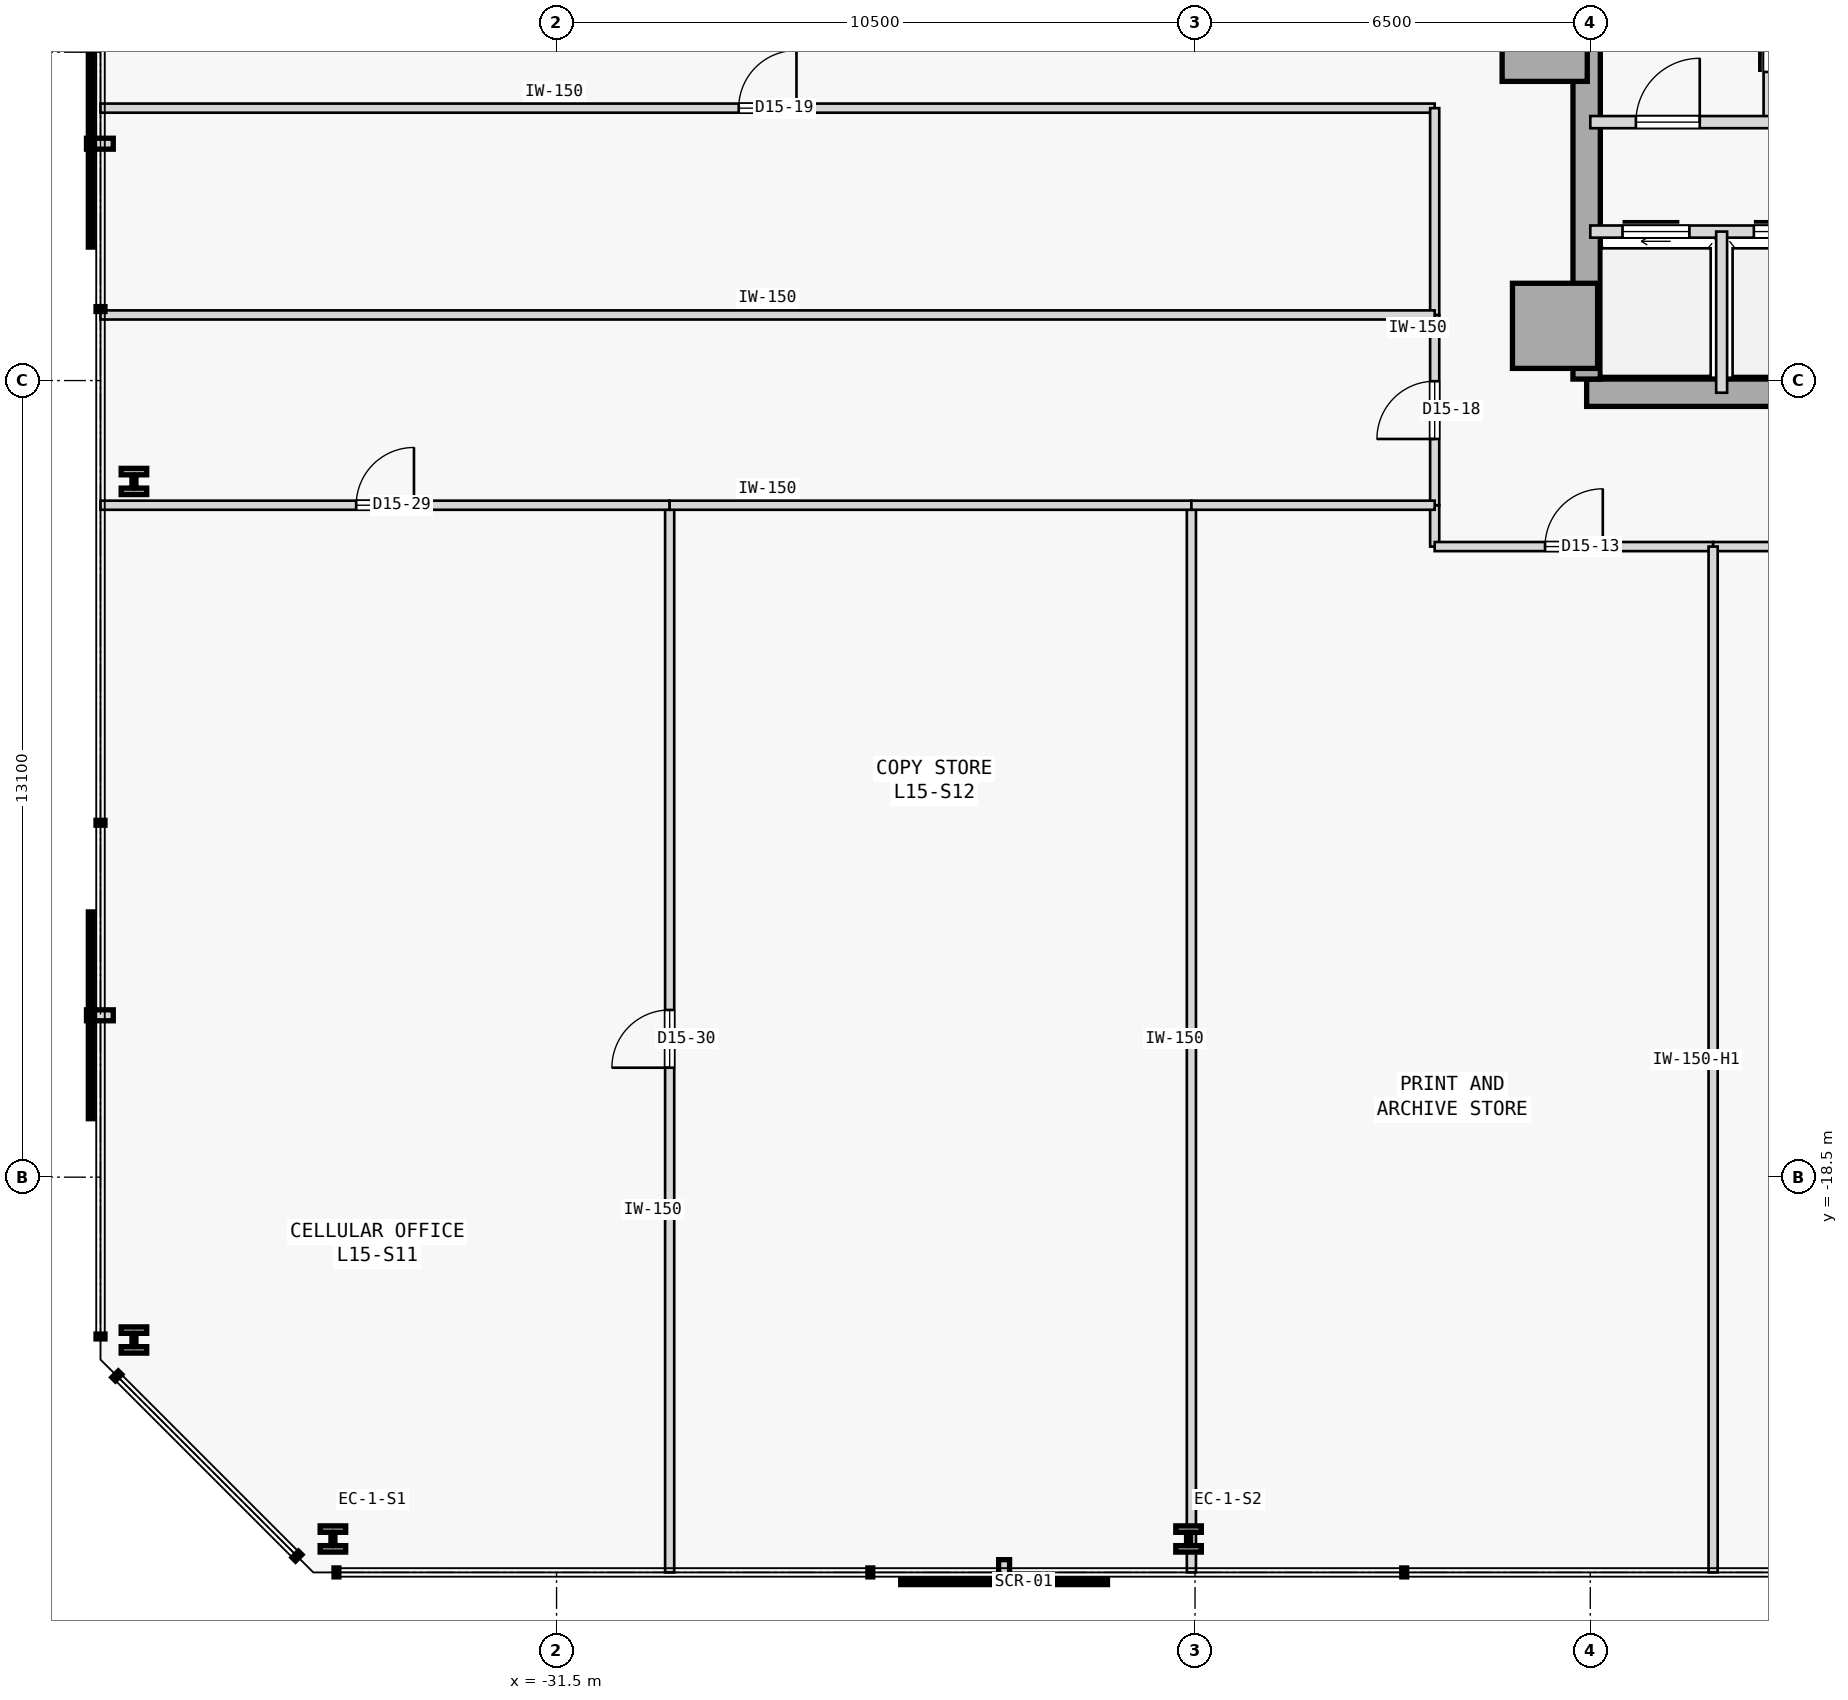
"""IFC4 building model, lengths in metres.
Left out: names, types, materials, properties, quantities, classifications, styles, units other than length and angle.
Written with IfcOpenShell. Run it as: python <this file> out.ifc"""

import sys

from ifc_helpers import new_model, si_unit, direction, frame, frame_2d, origin, origin_2d, place, context, subcontext, project, spatial, rectangle, i_section, extrude, element, fill, save


model = new_model("IFC4")
c1 = context("Model", 3, precision=1e-05, world=origin(), true_north=direction((0.0, 1.0)))
c2 = subcontext(c1, "Body", "Model", "MODEL_VIEW")
j1 = project(units=[si_unit("LENGTHUNIT", "METRE"), si_unit("PLANEANGLEUNIT", "RADIAN")], contexts=[c1])
p1 = place(None, origin())
s1 = spatial("IfcSite", under=j1, at=p1, CompositionType="ELEMENT")
p2 = place(p1, origin())
s2 = spatial("IfcBuilding", under=s1, at=p2, CompositionType="ELEMENT")
p3 = place(p2, frame((0.0, 0.0, 63.6)))
s3 = spatial("IfcBuildingStorey", under=s2, at=p3, CompositionType="ELEMENT", Elevation=63.6)
for number, where, z_axis, x_axis in (
    (1, (-15.25, 0.22, 0.0), (0.0, 0.0, 1.0), (1.0, 0.0, 0.0)),
    (2, (-15.08, -4.5, 0.0), (0.0, 0.0, 1.0), (1.0, 0.0, 0.0)),
):
    element("IfcColumn", number, at=place(p3, frame(where, z_axis=z_axis, x_axis=x_axis)), inside=s3, PredefinedType="COLUMN", context=c2, shape_type="SweptSolid", body=[
        extrude(rectangle(XDim=1.4, YDim=1.4, at=origin_2d()), origin(), (0.0, 0.0, 1.0), 3.8),
    ])
p4 = place(p3, frame((-14.56, -5.6, 0.0), z_axis=(0.0, 0.0, 1.0), x_axis=(1.0, 0.0, 0.0)))
e3 = element("IfcWall", 3, at=p4, inside=s3, PredefinedType="SHEAR", context=c2, shape_type="SweptSolid", body=[
    extrude(rectangle(XDim=10.86, YDim=0.45, at=frame_2d((5.43, 0.0))), origin(), (0.0, 0.0, 1.0), 3.575),
])
p5 = place(p3, frame((-14.56, -5.375, 0.0), z_axis=(0.0, 0.0, 1.0), x_axis=(0.0, 1.0, 0.0)))
e4 = element("IfcWall", 4, at=p5, inside=s3, PredefinedType="SHEAR", context=c2, shape_type="SweptSolid", body=[
    extrude(rectangle(XDim=10.75, YDim=0.45, at=frame_2d((5.375, 0.0))), origin(), (0.0, 0.0, 1.0), 3.575),
])
for number, where, z_axis, x_axis in (
    (5, (-35.178, -24.45, 0.0), (0.0, 0.0, 1.0), (1.0, 0.0, 0.0)),
    (6, (-21.107, -24.45, 0.0), (0.0, 0.0, 1.0), (1.0, 0.0, 0.0)),
    (7, (-38.45, -7.059, 0.0), (0.0, 0.0, 1.0), (1.0, 0.0, 0.0)),
    (8, (-38.45, -21.178, 0.0), (0.0, 0.0, 1.0), (1.0, 0.0, 0.0)),
):
    element("IfcColumn", number, at=place(p3, frame(where, z_axis=z_axis, x_axis=x_axis)), inside=s3, PredefinedType="COLUMN", context=c2, shape_type="SweptSolid", body=[
        extrude(i_section(OverallWidth=0.42, OverallDepth=0.431, WebThickness=0.065, FlangeThickness=0.106, FilletRadius=0.015, at=origin_2d()), origin(), (0.0, 0.0, 1.0), 3.8),
    ])
p6 = place(p3, frame((-11.55, -1.15, 0.0), z_axis=(0.0, 0.0, 1.0), x_axis=(0.0, 1.0, 0.0)))
e9 = element("IfcWall", 9, at=p6, inside=s3, PredefinedType="STANDARD", context=c2, shape_type="SweptSolid", body=[
    extrude(rectangle(XDim=2.75, YDim=0.2, at=frame_2d((1.375, 0.0))), origin(), (0.0, 0.0, 1.0), 3.575),
])
p7 = place(p6, frame((0.825, 0.0, 0.0)))
e10 = element("IfcOpeningElement", 10, at=p7, cuts=e9, PredefinedType="OPENING", context=c2, shape_type="SweptSolid", body=[
    extrude(rectangle(XDim=1.1, YDim=2.15, at=frame_2d((0.55, 1.075))), frame((0.0, 0.11, 0.0), z_axis=(0.0, -1.0, 0.0), x_axis=(1.0, 0.0, 0.0)), (0.0, 0.0, 1.0), 0.22),
])
p8 = place(p3, frame((-14.5, -1.15, 0.0), z_axis=(0.0, 0.0, 1.0), x_axis=(1.0, 0.0, 0.0)))
e11 = element("IfcWall", 11, at=p8, inside=s3, PredefinedType="STANDARD", context=c2, shape_type="SweptSolid", body=[
    extrude(rectangle(XDim=2.95, YDim=0.2, at=frame_2d((1.475, 0.0))), origin(), (0.0, 0.0, 1.0), 3.575),
])
p9 = place(p8, frame((0.75, 0.0, 0.0)))
e12 = element("IfcOpeningElement", 12, at=p9, cuts=e11, PredefinedType="OPENING", context=c2, shape_type="SweptSolid", body=[
    extrude(rectangle(XDim=1.05, YDim=2.18, at=frame_2d((0.525, 1.09))), frame((0.0, 0.11, 0.0), z_axis=(0.0, -1.0, 0.0), x_axis=(1.0, 0.0, 0.0)), (0.0, 0.0, 1.0), 0.22),
])
p10 = place(p3, frame((-14.5, -2.95, 0.0), z_axis=(0.0, 0.0, 1.0), x_axis=(1.0, 0.0, 0.0)))
e13 = element("IfcWall", 13, at=p10, inside=s3, PredefinedType="STANDARD", context=c2, shape_type="SweptSolid", body=[
    extrude(rectangle(XDim=10.8, YDim=0.2, at=frame_2d((5.4, 0.0))), origin(), (0.0, 0.0, 1.0), 3.575),
])
p11 = place(p10, frame((0.53, 0.0, 0.0)))
e14 = element("IfcOpeningElement", 14, at=p11, cuts=e13, PredefinedType="OPENING", context=c2, shape_type="SweptSolid", body=[
    extrude(rectangle(XDim=1.1, YDim=2.15, at=frame_2d((0.55, 1.075))), frame((0.0, 0.11, 0.0), z_axis=(0.0, -1.0, 0.0), x_axis=(1.0, 0.0, 0.0)), (0.0, 0.0, 1.0), 0.22),
])
p12 = place(p10, frame((2.69, 0.0, 0.0)))
e15 = element("IfcOpeningElement", 15, at=p12, cuts=e13, PredefinedType="OPENING", context=c2, shape_type="SweptSolid", body=[
    extrude(rectangle(XDim=1.1, YDim=2.15, at=frame_2d((0.55, 1.075))), frame((0.0, 0.11, 0.0), z_axis=(0.0, -1.0, 0.0), x_axis=(1.0, 0.0, 0.0)), (0.0, 0.0, 1.0), 0.22),
])
p13 = place(p3, frame((-12.34, -5.6, 0.0), z_axis=(0.0, 0.0, 1.0), x_axis=(0.0, 1.0, 0.0)))
e16 = element("IfcWall", 16, at=p13, inside=s3, PredefinedType="STANDARD", context=c2, shape_type="SweptSolid", body=[
    extrude(rectangle(XDim=2.65, YDim=0.18, at=frame_2d((1.325, 0.0))), origin(), (0.0, 0.0, 1.0), 3.575),
])
p14 = place(p3, frame((-17.059, -8.13, 0.0), z_axis=(0.0, 0.0, 1.0), x_axis=(0.0, 1.0, 0.0)))
e17 = element("IfcWall", 17, at=p14, inside=s3, PredefinedType="PARTITIONING", context=c2, shape_type="SweptSolid", body=[
    extrude(rectangle(XDim=0.68, YDim=0.15, at=frame_2d((0.34, 0.0))), origin(), (0.0, 0.0, 1.0), 3.575),
])
p15 = place(p3, frame((-17.059, -8.13, 0.0), z_axis=(0.0, 0.0, 1.0), x_axis=(1.0, 0.0, 0.0)))
e18 = element("IfcWall", 18, at=p15, inside=s3, PredefinedType="PARTITIONING", context=c2, shape_type="SweptSolid", body=[
    extrude(rectangle(XDim=4.579, YDim=0.15, at=frame_2d((2.29, 0.0))), origin(), (0.0, 0.0, 1.0), 3.575),
])
p16 = place(p15, frame((1.814, 0.0, 0.0)))
e19 = element("IfcOpeningElement", 19, at=p16, cuts=e18, PredefinedType="OPENING", context=c2, shape_type="SweptSolid", body=[
    extrude(rectangle(XDim=0.95, YDim=2.15, at=frame_2d((0.475, 1.075))), frame((0.0, 0.085, 0.0), z_axis=(0.0, -1.0, 0.0), x_axis=(1.0, 0.0, 0.0)), (0.0, 0.0, 1.0), 0.17),
])
p17 = place(p3, frame((-12.48, -8.13, 0.0), z_axis=(0.0, 0.0, 1.0), x_axis=(1.0, 0.0, 0.0)))
e20 = element("IfcWall", 20, at=p17, inside=s3, PredefinedType="PARTITIONING", context=c2, shape_type="SweptSolid", body=[
    extrude(rectangle(XDim=11.56, YDim=0.15, at=frame_2d((5.78, 0.0))), origin(), (0.0, 0.0, 1.0), 3.575),
])
p18 = place(p3, frame((-17.059, -7.45, 0.0), z_axis=(0.0, 0.0, 1.0), x_axis=(0.0, 1.0, 0.0)))
e21 = element("IfcWall", 21, at=p18, inside=s3, PredefinedType="PARTITIONING", context=c2, shape_type="SweptSolid", body=[
    extrude(rectangle(XDim=3.129, YDim=0.15, at=frame_2d((1.564, 0.0))), origin(), (0.0, 0.0, 1.0), 3.575),
])
p19 = place(p18, frame((1.09, 0.0, 0.0)))
e22 = element("IfcOpeningElement", 22, at=p19, cuts=e21, PredefinedType="OPENING", context=c2, shape_type="SweptSolid", body=[
    extrude(rectangle(XDim=0.95, YDim=2.15, at=frame_2d((0.475, 1.075))), frame((0.0, 0.085, 0.0), z_axis=(0.0, -1.0, 0.0), x_axis=(1.0, 0.0, 0.0)), (0.0, 0.0, 1.0), 0.17),
])
p20 = place(p3, frame((-39.0, -0.92, 0.0), z_axis=(0.0, 0.0, 1.0), x_axis=(1.0, 0.0, 0.0)))
e23 = element("IfcWall", 23, at=p20, inside=s3, PredefinedType="PARTITIONING", context=c2, shape_type="SweptSolid", body=[
    extrude(rectangle(XDim=21.941, YDim=0.15, at=frame_2d((10.97, 0.0))), origin(), (0.0, 0.0, 1.0), 3.575),
])
p21 = place(p20, frame((10.496, 0.0, 0.0)))
e24 = element("IfcOpeningElement", 24, at=p21, cuts=e23, PredefinedType="OPENING", context=c2, shape_type="SweptSolid", body=[
    extrude(rectangle(XDim=0.95, YDim=2.15, at=frame_2d((0.475, 1.075))), frame((0.0, 0.085, 0.0), z_axis=(0.0, -1.0, 0.0), x_axis=(1.0, 0.0, 0.0)), (0.0, 0.0, 1.0), 0.17),
])
p22 = place(p3, frame((-17.059, -4.321, 0.0), z_axis=(0.0, 0.0, 1.0), x_axis=(0.0, 1.0, 0.0)))
e25 = element("IfcWall", 25, at=p22, inside=s3, PredefinedType="PARTITIONING", context=c2, shape_type="SweptSolid", body=[
    extrude(rectangle(XDim=3.401, YDim=0.15, at=frame_2d((1.701, 0.0))), origin(), (0.0, 0.0, 1.0), 3.575),
])
p23 = place(p3, frame((-29.64, -25.0, 0.0), z_axis=(0.0, 0.0, 1.0), x_axis=(0.0, 1.0, 0.0)))
e26 = element("IfcWall", 26, at=p23, inside=s3, PredefinedType="PARTITIONING", context=c2, shape_type="SweptSolid", body=[
    extrude(rectangle(XDim=17.55, YDim=0.15, at=frame_2d((8.775, 0.0))), origin(), (0.0, 0.0, 1.0), 3.575),
])
p24 = place(p23, frame((8.3, 0.0, 0.0)))
e27 = element("IfcOpeningElement", 27, at=p24, cuts=e26, PredefinedType="OPENING", context=c2, shape_type="SweptSolid", body=[
    extrude(rectangle(XDim=0.95, YDim=2.15, at=frame_2d((0.475, 1.075))), frame((0.0, 0.085, 0.0), z_axis=(0.0, -1.0, 0.0), x_axis=(1.0, 0.0, 0.0)), (0.0, 0.0, 1.0), 0.17),
])
p25 = place(p3, frame((-39.0, -7.45, 0.0), z_axis=(0.0, 0.0, 1.0), x_axis=(1.0, 0.0, 0.0)))
e28 = element("IfcWall", 28, at=p25, inside=s3, PredefinedType="PARTITIONING", context=c2, shape_type="SweptSolid", body=[
    extrude(rectangle(XDim=9.36, YDim=0.15, at=frame_2d((4.68, 0.0))), origin(), (0.0, 0.0, 1.0), 3.575),
])
p26 = place(p25, frame((4.205, 0.0, 0.0)))
e29 = element("IfcOpeningElement", 29, at=p26, cuts=e28, PredefinedType="OPENING", context=c2, shape_type="SweptSolid", body=[
    extrude(rectangle(XDim=0.95, YDim=2.15, at=frame_2d((0.475, 1.075))), frame((0.0, 0.085, 0.0), z_axis=(0.0, -1.0, 0.0), x_axis=(1.0, 0.0, 0.0)), (0.0, 0.0, 1.0), 0.17),
])
p27 = place(p3, frame((-21.06, -25.0, 0.0), z_axis=(0.0, 0.0, 1.0), x_axis=(0.0, 1.0, 0.0)))
e30 = element("IfcWall", 30, at=p27, inside=s3, PredefinedType="PARTITIONING", context=c2, shape_type="SweptSolid", body=[
    extrude(rectangle(XDim=17.55, YDim=0.15, at=frame_2d((8.775, 0.0))), origin(), (0.0, 0.0, 1.0), 3.575),
])
p28 = place(p3, frame((-29.64, -7.45, 0.0), z_axis=(0.0, 0.0, 1.0), x_axis=(1.0, 0.0, 0.0)))
e31 = element("IfcWall", 31, at=p28, inside=s3, PredefinedType="PARTITIONING", context=c2, shape_type="SweptSolid", body=[
    extrude(rectangle(XDim=8.58, YDim=0.15, at=frame_2d((4.29, 0.0))), origin(), (0.0, 0.0, 1.0), 3.575),
])
p29 = place(p3, frame((-12.48, -25.0, 0.0), z_axis=(0.0, 0.0, 1.0), x_axis=(0.0, 1.0, 0.0)))
e32 = element("IfcWall", 32, at=p29, inside=s3, PredefinedType="PARTITIONING", context=c2, shape_type="SweptSolid", body=[
    extrude(rectangle(XDim=16.87, YDim=0.15, at=frame_2d((8.435, 0.0))), origin(), (0.0, 0.0, 1.0), 3.125),
])
p30 = place(p3, frame((-21.06, -7.45, 0.0), z_axis=(0.0, 0.0, 1.0), x_axis=(1.0, 0.0, 0.0)))
e33 = element("IfcWall", 33, at=p30, inside=s3, PredefinedType="PARTITIONING", context=c2, shape_type="SweptSolid", body=[
    extrude(rectangle(XDim=4.001, YDim=0.15, at=frame_2d((2.0, 0.0))), origin(), (0.0, 0.0, 1.0), 3.575),
])
p31 = place(p3, frame((-39.0, -4.321, 0.0), z_axis=(0.0, 0.0, 1.0), x_axis=(1.0, 0.0, 0.0)))
e34 = element("IfcWall", 34, at=p31, inside=s3, PredefinedType="PARTITIONING", context=c2, shape_type="SweptSolid", body=[
    extrude(rectangle(XDim=21.941, YDim=0.15, at=frame_2d((10.97, 0.0))), origin(), (0.0, 0.0, 1.0), 3.575),
])
p32 = place(p9, origin())
e35 = element("IfcDoor", 35, at=p32, inside=s3, OperationType="SINGLE_SWING_RIGHT", PredefinedType="DOOR", context=c2, shape_type="SweptSolid", body=[
    extrude(rectangle(XDim=1.05, YDim=2.18, at=frame_2d((0.525, 1.09))), frame((0.0, 0.025, 0.0), z_axis=(0.0, -1.0, 0.0), x_axis=(1.0, 0.0, 0.0)), (0.0, 0.0, 1.0), 0.05),
])
fill(e12, e35)
p33 = place(p7, origin())
e36 = element("IfcDoor", 36, at=p33, inside=s3, OperationType="SLIDING_TO_RIGHT", PredefinedType="DOOR", context=c2, shape_type="SweptSolid", body=[
    extrude(rectangle(XDim=1.1, YDim=2.15, at=frame_2d((0.55, 1.075))), frame((0.0, 0.025, 0.0), z_axis=(0.0, -1.0, 0.0), x_axis=(1.0, 0.0, 0.0)), (0.0, 0.0, 1.0), 0.05),
])
fill(e10, e36)
p34 = place(p11, origin())
e37 = element("IfcDoor", 37, at=p34, inside=s3, OperationType="SLIDING_TO_RIGHT", PredefinedType="DOOR", context=c2, shape_type="SweptSolid", body=[
    extrude(rectangle(XDim=1.1, YDim=2.15, at=frame_2d((0.55, 1.075))), frame((0.0, 0.025, 0.0), z_axis=(0.0, -1.0, 0.0), x_axis=(1.0, 0.0, 0.0)), (0.0, 0.0, 1.0), 0.05),
])
fill(e14, e37)
p35 = place(p12, origin())
e38 = element("IfcDoor", 38, at=p35, inside=s3, OperationType="SLIDING_TO_RIGHT", PredefinedType="DOOR", context=c2, shape_type="SweptSolid", body=[
    extrude(rectangle(XDim=1.1, YDim=2.15, at=frame_2d((0.55, 1.075))), frame((0.0, 0.025, 0.0), z_axis=(0.0, -1.0, 0.0), x_axis=(1.0, 0.0, 0.0)), (0.0, 0.0, 1.0), 0.05),
])
fill(e15, e38)
p36 = place(p16, origin())
e39 = element("IfcDoor", 39, at=p36, inside=s3, OperationType="SINGLE_SWING_RIGHT", PredefinedType="DOOR", context=c2, shape_type="SweptSolid", body=[
    extrude(rectangle(XDim=0.95, YDim=2.15, at=frame_2d((0.475, 1.075))), frame((0.0, 0.025, 0.0), z_axis=(0.0, -1.0, 0.0), x_axis=(1.0, 0.0, 0.0)), (0.0, 0.0, 1.0), 0.05),
])
fill(e19, e39)
p37 = place(p19, origin())
e40 = element("IfcDoor", 40, at=p37, inside=s3, OperationType="SINGLE_SWING_LEFT", PredefinedType="DOOR", context=c2, shape_type="SweptSolid", body=[
    extrude(rectangle(XDim=0.95, YDim=2.15, at=frame_2d((0.475, 1.075))), frame((0.0, 0.025, 0.0), z_axis=(0.0, -1.0, 0.0), x_axis=(1.0, 0.0, 0.0)), (0.0, 0.0, 1.0), 0.05),
])
fill(e22, e40)
p38 = place(p21, origin())
e41 = element("IfcDoor", 41, at=p38, inside=s3, OperationType="SINGLE_SWING_RIGHT", PredefinedType="DOOR", context=c2, shape_type="SweptSolid", body=[
    extrude(rectangle(XDim=0.95, YDim=2.15, at=frame_2d((0.475, 1.075))), frame((0.0, 0.025, 0.0), z_axis=(0.0, -1.0, 0.0), x_axis=(1.0, 0.0, 0.0)), (0.0, 0.0, 1.0), 0.05),
])
fill(e24, e41)
p39 = place(p26, origin())
e42 = element("IfcDoor", 42, at=p39, inside=s3, OperationType="SINGLE_SWING_RIGHT", PredefinedType="DOOR", context=c2, shape_type="SweptSolid", body=[
    extrude(rectangle(XDim=0.95, YDim=2.15, at=frame_2d((0.475, 1.075))), frame((0.0, 0.025, 0.0), z_axis=(0.0, -1.0, 0.0), x_axis=(1.0, 0.0, 0.0)), (0.0, 0.0, 1.0), 0.05),
])
fill(e29, e42)
p40 = place(p24, origin())
e43 = element("IfcDoor", 43, at=p40, inside=s3, OperationType="SINGLE_SWING_LEFT", PredefinedType="DOOR", context=c2, shape_type="SweptSolid", body=[
    extrude(rectangle(XDim=0.95, YDim=2.15, at=frame_2d((0.475, 1.075))), frame((0.0, 0.025, 0.0), z_axis=(0.0, -1.0, 0.0), x_axis=(1.0, 0.0, 0.0)), (0.0, 0.0, 1.0), 0.05),
])
fill(e27, e43)
save(model, sys.argv[1])
